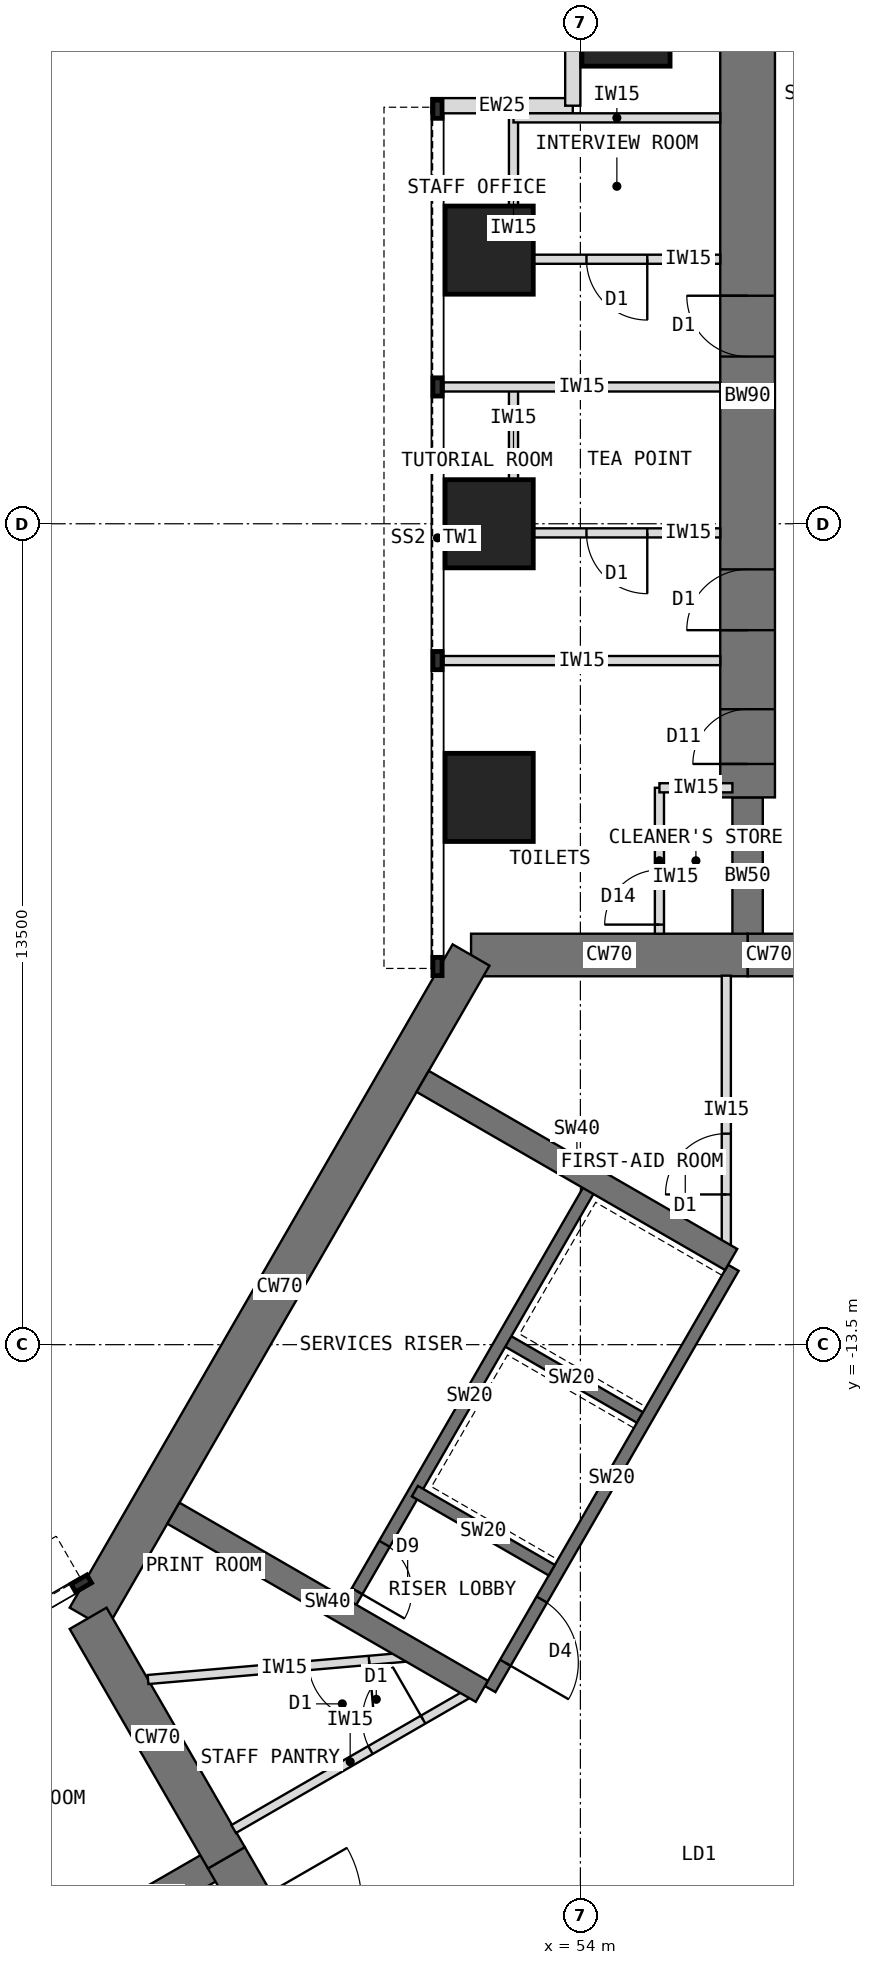
"""IFC4 building model, lengths in metres.
Left out: names, types, materials, properties, quantities, classifications, styles, units other than length and angle.
Written with IfcOpenShell. Run it as: python <this file> out.ifc"""

import sys

from ifc_helpers import new_model, si_unit, direction, frame, frame_2d, origin, origin_2d, place, context, subcontext, project, spatial, rectangle, extrude, element, fill, save


model = new_model("IFC4")
c1 = context("Model", 3, precision=1e-05, world=origin(), true_north=direction((0.0, 1.0)))
c2 = subcontext(c1, "Body", "Model", "MODEL_VIEW")
j1 = project(units=[si_unit("LENGTHUNIT", "METRE"), si_unit("PLANEANGLEUNIT", "RADIAN")], contexts=[c1])
p1 = place(None, origin())
s1 = spatial("IfcSite", under=j1, at=p1, CompositionType="ELEMENT")
p2 = place(p1, origin())
s2 = spatial("IfcBuilding", under=s1, at=p2, CompositionType="ELEMENT")
p3 = place(p2, frame((0.0, 0.0, 64.5)))
s3 = spatial("IfcBuildingStorey", under=s2, at=p3, CompositionType="ELEMENT", Elevation=64.5)
p4 = place(p3, frame((60.25, -7.092, 0.0), z_axis=(0.0, 0.0, 1.0), x_axis=(-1.0, 0.0, 0.0)))
e1 = element("IfcWall", 1, at=p4, inside=s3, PredefinedType="SHEAR", context=c2, shape_type="SweptSolid", body=[
    extrude(rectangle(XDim=3.5, YDim=0.7, at=frame_2d((1.75, 0.0))), origin(), (0.0, 0.0, 1.0), 4.0),
])
p5 = place(p4, frame((0.85, 0.0, 0.0)))
e2 = element("IfcOpeningElement", 2, at=p5, cuts=e1, PredefinedType="OPENING", context=c2, shape_type="SweptSolid", body=[
    extrude(rectangle(XDim=1.8, YDim=2.1, at=frame_2d((0.9, 1.05))), frame((0.0, 0.36, 0.0), z_axis=(0.0, -1.0, 0.0), x_axis=(1.0, 0.0, 0.0)), (0.0, 0.0, 1.0), 0.72),
])
p6 = place(p3, frame((56.75, -7.092, 0.0), z_axis=(0.0, 0.0, 1.0), x_axis=(-1.0, 0.0, 0.0)))
e3 = element("IfcWall", 3, at=p6, inside=s3, PredefinedType="SHEAR", context=c2, shape_type="SweptSolid", body=[
    extrude(rectangle(XDim=4.548, YDim=0.7, at=frame_2d((2.274, 0.0))), origin(), (0.0, 0.0, 1.0), 4.0),
])
p7 = place(p3, frame((52.202, -7.092, 0.0), z_axis=(0.0, 0.0, 1.0), x_axis=(-0.500005998175, -0.866021940709, 0.0)))
e4 = element("IfcWall", 4, at=p7, inside=s3, PredefinedType="SHEAR", context=c2, shape_type="SweptSolid", body=[
    extrude(rectangle(XDim=12.596, YDim=0.7, at=frame_2d((6.298, 0.0))), origin(), (0.0, 0.0, 1.0), 4.0),
])
p8 = place(p3, frame((45.904, -18.0, 0.0), z_axis=(0.0, 0.0, 1.0), x_axis=(0.500024481964, -0.866011268655, 0.0)))
e5 = element("IfcWall", 5, at=p8, inside=s3, PredefinedType="SHEAR", context=c2, shape_type="SweptSolid", body=[
    extrude(rectangle(XDim=4.548, YDim=0.7, at=frame_2d((2.274, 0.0))), origin(), (0.0, 0.0, 1.0), 4.0),
])
p9 = place(p3, frame((48.178, -21.939, 0.0), z_axis=(0.0, 0.0, 1.0), x_axis=(0.500010275428, -0.866019471182, 0.0)))
e6 = element("IfcWall", 6, at=p9, inside=s3, PredefinedType="SHEAR", context=c2, shape_type="SweptSolid", body=[
    extrude(rectangle(XDim=3.5, YDim=0.7, at=frame_2d((1.75, 0.0))), origin(), (0.0, 0.0, 1.0), 4.0),
])
p10 = place(p9, frame((0.85, 0.0, 0.0)))
e7 = element("IfcOpeningElement", 7, at=p10, cuts=e6, PredefinedType="OPENING", context=c2, shape_type="SweptSolid", body=[
    extrude(rectangle(XDim=1.8, YDim=2.1, at=frame_2d((0.9, 1.05))), frame((0.0, 0.36, 0.0), z_axis=(0.0, -1.0, 0.0), x_axis=(1.0, 0.0, 0.0)), (0.0, 0.0, 1.0), 0.72),
])
p11 = place(p3, frame((56.75, -7.092, 0.0), z_axis=(0.0, 0.0, 1.0), x_axis=(0.0, 1.0, 0.0)))
e8 = element("IfcWall", 8, at=p11, inside=s3, PredefinedType="SHEAR", context=c2, shape_type="SweptSolid", body=[
    extrude(rectangle(XDim=2.592, YDim=0.5, at=frame_2d((1.296, 0.0))), origin(), (0.0, 0.0, 1.0), 4.0),
])
p12 = place(p3, frame((56.75, -4.5, 0.0), z_axis=(0.0, 0.0, 1.0), x_axis=(0.0, 1.0, 0.0)))
e9 = element("IfcWall", 9, at=p12, inside=s3, PredefinedType="SHEAR", context=c2, shape_type="SweptSolid", body=[
    extrude(rectangle(XDim=13.2, YDim=0.9, at=frame_2d((6.6, 0.0))), origin(), (0.0, 0.0, 1.0), 4.0),
])
p13 = place(p12, frame((0.55, 0.0, 0.0)))
e10 = element("IfcOpeningElement", 10, at=p13, cuts=e9, PredefinedType="OPENING", context=c2, shape_type="SweptSolid", body=[
    extrude(rectangle(XDim=0.9, YDim=2.1, at=frame_2d((0.45, 1.05))), frame((0.0, 0.46, 0.0), z_axis=(0.0, -1.0, 0.0), x_axis=(1.0, 0.0, 0.0)), (0.0, 0.0, 1.0), 0.92),
])
p14 = place(p12, frame((2.75, 0.0, 0.0)))
e11 = element("IfcOpeningElement", 11, at=p14, cuts=e9, PredefinedType="OPENING", context=c2, shape_type="SweptSolid", body=[
    extrude(rectangle(XDim=1.0, YDim=2.1, at=frame_2d((0.5, 1.05))), frame((0.0, 0.46, 0.0), z_axis=(0.0, -1.0, 0.0), x_axis=(1.0, 0.0, 0.0)), (0.0, 0.0, 1.0), 0.92),
])
p15 = place(p12, frame((7.25, 0.0, 0.0)))
e12 = element("IfcOpeningElement", 12, at=p15, cuts=e9, PredefinedType="OPENING", context=c2, shape_type="SweptSolid", body=[
    extrude(rectangle(XDim=1.0, YDim=2.1, at=frame_2d((0.5, 1.05))), frame((0.0, 0.46, 0.0), z_axis=(0.0, -1.0, 0.0), x_axis=(1.0, 0.0, 0.0)), (0.0, 0.0, 1.0), 0.92),
])
p16 = place(p3, frame((48.178, -21.939, 0.0), z_axis=(0.0, 0.0, 1.0), x_axis=(-0.866072649678, -0.499918158782, 0.0)))
e13 = element("IfcWall", 13, at=p16, inside=s3, PredefinedType="SHEAR", context=c2, shape_type="SweptSolid", body=[
    extrude(rectangle(XDim=2.592, YDim=0.5, at=frame_2d((1.296, 0.0))), origin(), (0.0, 0.0, 1.0), 4.0),
])
for number, where, z_axis, x_axis in (
    (14, (52.5, -4.5, 0.0), (0.0, 0.0, 1.0), (1.0, 0.0, 0.0)),
    (15, (52.5, 0.0, 0.0), (0.0, 0.0, 1.0), (1.0, 0.0, 0.0)),
    (16, (52.5, 4.5, 0.0), (0.0, 0.0, 1.0), (1.0, 0.0, 0.0)),
    (17, (54.75, 8.25, 0.0), (0.0, 0.0, 1.0), (1.0, 0.0, 0.0)),
):
    element("IfcColumn", number, at=place(p3, frame(where, z_axis=z_axis, x_axis=x_axis)), inside=s3, PredefinedType="COLUMN", context=c2, shape_type="SweptSolid", body=[
        extrude(rectangle(XDim=1.45, YDim=1.45, at=origin_2d()), origin(), (0.0, 0.0, 1.0), 4.0),
    ])
for number, where, z_axis, x_axis in (
    (18, (51.55, 6.875, 0.0), (0.0, 0.0, 1.0), (1.0, 0.0, 0.0)),
    (19, (53.875, 6.875, 0.0), (0.0, 0.0, 1.0), (0.0, 1.0, 0.0)),
):
    element("IfcWall", number, at=place(p3, frame(where, z_axis=z_axis, x_axis=x_axis)), inside=s3, PredefinedType="STANDARD", context=c2, shape_type="SweptSolid", body=[
        extrude(rectangle(XDim=2.325, YDim=0.25, at=frame_2d((1.163, 0.0))), origin(), (0.0, 0.0, 1.0), 3.8),
    ])
p17 = place(p3, frame((56.516, -12.236, 0.0), z_axis=(0.0, 0.0, 1.0), x_axis=(-0.49999894854, -0.866026010844, 0.0)))
e20 = element("IfcWall", 20, at=p17, inside=s3, PredefinedType="SHEAR", context=c2, shape_type="SweptSolid", body=[
    extrude(rectangle(XDim=8.0, YDim=0.2, at=frame_2d((4.0, 0.0))), origin(), (0.0, 0.0, 1.0), 4.0),
])
p18 = place(p17, frame((6.3, 0.0, 0.0)))
e21 = element("IfcOpeningElement", 21, at=p18, cuts=e20, PredefinedType="OPENING", context=c2, shape_type="SweptSolid", body=[
    extrude(rectangle(XDim=1.2, YDim=2.1, at=frame_2d((0.6, 1.05))), frame((0.0, 0.11, 0.0), z_axis=(0.0, -1.0, 0.0), x_axis=(1.0, 0.0, 0.0)), (0.0, 0.0, 1.0), 0.22),
])
for number, where, z_axis, x_axis in (
    (22, (54.98, -14.697, 0.0), (0.0, 0.0, 1.0), (-0.866, 0.5, 0.0)),
    (23, (53.53, -17.209, 0.0), (0.0, 0.0, 1.0), (-0.866, 0.5, 0.0)),
):
    element("IfcWall", number, at=place(p3, frame(where, z_axis=z_axis, x_axis=x_axis)), inside=s3, PredefinedType="SHEAR", context=c2, shape_type="SweptSolid", body=[
        extrude(rectangle(XDim=2.6, YDim=0.2, at=frame_2d((1.3, 0.0))), origin(), (0.0, 0.0, 1.0), 4.0),
    ])
p19 = place(p3, frame((54.178, -10.886, 0.0), z_axis=(0.0, 0.0, 1.0), x_axis=(-0.49999894854, -0.866026010844, 0.0)))
e24 = element("IfcWall", 24, at=p19, inside=s3, PredefinedType="SHEAR", context=c2, shape_type="SweptSolid", body=[
    extrude(rectangle(XDim=8.0, YDim=0.2, at=frame_2d((4.0, 0.0))), origin(), (0.0, 0.0, 1.0), 4.0),
])
p20 = place(p19, frame((6.8, 0.0, 0.0)))
e25 = element("IfcOpeningElement", 25, at=p20, cuts=e24, PredefinedType="OPENING", context=c2, shape_type="SweptSolid", body=[
    extrude(rectangle(XDim=0.9, YDim=2.1, at=frame_2d((0.45, 1.05))), frame((0.0, 0.11, 0.0), z_axis=(0.0, -1.0, 0.0), x_axis=(1.0, 0.0, 0.0)), (0.0, 0.0, 1.0), 0.22),
])
for number, where, z_axis, x_axis in (
    (26, (52.38, -19.201, 0.0), (0.0, 0.0, 1.0), (-0.866, 0.5, 0.0)),
    (27, (56.48, -12.099, 0.0), (0.0, 0.0, 1.0), (-0.866, 0.5, 0.0)),
):
    element("IfcWall", number, at=place(p3, frame(where, z_axis=z_axis, x_axis=x_axis)), inside=s3, PredefinedType="SHEAR", context=c2, shape_type="SweptSolid", body=[
        extrude(rectangle(XDim=5.858, YDim=0.4, at=frame_2d((2.929, 0.0))), origin(), (0.0, 0.0, 1.0), 4.0),
    ])
for number, where, z_axis, x_axis in (
    (28, (56.3, -2.25, 0.0), (0.0, 0.0, 1.0), (-1.0, 0.0, 0.0)),
    (29, (56.3, 2.25, 0.0), (0.0, 0.0, 1.0), (-1.0, 0.0, 0.0)),
):
    element("IfcWall", number, at=place(p3, frame(where, z_axis=z_axis, x_axis=x_axis)), inside=s3, PredefinedType="PARTITIONING", context=c2, shape_type="SweptSolid", body=[
        extrude(rectangle(XDim=4.55, YDim=0.15, at=frame_2d((2.275, 0.0))), origin(), (0.0, 0.0, 1.0), 3.8),
    ])
p21 = place(p3, frame((52.9, -0.15, 0.0), z_axis=(0.0, 0.0, 1.0), x_axis=(0.0, 1.0, 0.0)))
e30 = element("IfcWall", 30, at=p21, inside=s3, PredefinedType="PARTITIONING", context=c2, shape_type="SweptSolid", body=[
    extrude(rectangle(XDim=2.4, YDim=0.15, at=frame_2d((1.2, 0.0))), origin(), (0.0, 0.0, 1.0), 3.8),
])
p22 = place(p3, frame((56.3, -0.15, 0.0), z_axis=(0.0, 0.0, 1.0), x_axis=(-1.0, 0.0, 0.0)))
e31 = element("IfcWall", 31, at=p22, inside=s3, PredefinedType="PARTITIONING", context=c2, shape_type="SweptSolid", body=[
    extrude(rectangle(XDim=3.4, YDim=0.15, at=frame_2d((1.7, 0.0))), origin(), (0.0, 0.0, 1.0), 3.8),
])
p23 = place(p22, frame((1.2, 0.0, 0.0)))
e32 = element("IfcOpeningElement", 32, at=p23, cuts=e31, PredefinedType="OPENING", context=c2, shape_type="SweptSolid", body=[
    extrude(rectangle(XDim=1.0, YDim=2.1, at=frame_2d((0.5, 1.05))), frame((0.0, 0.085, 0.0), z_axis=(0.0, -1.0, 0.0), x_axis=(1.0, 0.0, 0.0)), (0.0, 0.0, 1.0), 0.17),
])
p24 = place(p3, frame((52.9, 4.35, 0.0), z_axis=(0.0, 0.0, 1.0), x_axis=(0.0, 1.0, 0.0)))
e33 = element("IfcWall", 33, at=p24, inside=s3, PredefinedType="PARTITIONING", context=c2, shape_type="SweptSolid", body=[
    extrude(rectangle(XDim=2.4, YDim=0.15, at=frame_2d((1.2, 0.0))), origin(), (0.0, 0.0, 1.0), 3.8),
])
p25 = place(p3, frame((56.3, 4.35, 0.0), z_axis=(0.0, 0.0, 1.0), x_axis=(-1.0, 0.0, 0.0)))
e34 = element("IfcWall", 34, at=p25, inside=s3, PredefinedType="PARTITIONING", context=c2, shape_type="SweptSolid", body=[
    extrude(rectangle(XDim=3.4, YDim=0.15, at=frame_2d((1.7, 0.0))), origin(), (0.0, 0.0, 1.0), 3.8),
])
p26 = place(p25, frame((1.2, 0.0, 0.0)))
e35 = element("IfcOpeningElement", 35, at=p26, cuts=e34, PredefinedType="OPENING", context=c2, shape_type="SweptSolid", body=[
    extrude(rectangle(XDim=1.0, YDim=2.1, at=frame_2d((0.5, 1.05))), frame((0.0, 0.085, 0.0), z_axis=(0.0, -1.0, 0.0), x_axis=(1.0, 0.0, 0.0)), (0.0, 0.0, 1.0), 0.17),
])
p27 = place(p3, frame((56.3, 6.675, 0.0), z_axis=(0.0, 0.0, 1.0), x_axis=(-1.0, 0.0, 0.0)))
e36 = element("IfcWall", 36, at=p27, inside=s3, PredefinedType="PARTITIONING", context=c2, shape_type="SweptSolid", body=[
    extrude(rectangle(XDim=3.4, YDim=0.15, at=frame_2d((1.7, 0.0))), origin(), (0.0, 0.0, 1.0), 3.8),
])
p28 = place(p3, frame((55.3, -6.742, 0.0), z_axis=(0.0, 0.0, 1.0), x_axis=(0.0, 1.0, 0.0)))
e37 = element("IfcWall", 37, at=p28, inside=s3, PredefinedType="PARTITIONING", context=c2, shape_type="SweptSolid", body=[
    extrude(rectangle(XDim=2.4, YDim=0.15, at=frame_2d((1.2, 0.0))), origin(), (0.0, 0.0, 1.0), 3.8),
])
p29 = place(p28, frame((0.15, 0.0, 0.0)))
e38 = element("IfcOpeningElement", 38, at=p29, cuts=e37, PredefinedType="OPENING", context=c2, shape_type="SweptSolid", body=[
    extrude(rectangle(XDim=0.9, YDim=2.1, at=frame_2d((0.45, 1.05))), frame((0.0, 0.085, 0.0), z_axis=(0.0, -1.0, 0.0), x_axis=(1.0, 0.0, 0.0)), (0.0, 0.0, 1.0), 0.17),
])
p30 = place(p3, frame((56.5, -4.342, 0.0), z_axis=(0.0, 0.0, 1.0), x_axis=(-1.0, 0.0, 0.0)))
e39 = element("IfcWall", 39, at=p30, inside=s3, PredefinedType="PARTITIONING", context=c2, shape_type="SweptSolid", body=[
    extrude(rectangle(XDim=1.2, YDim=0.15, at=frame_2d((0.6, 0.0))), origin(), (0.0, 0.0, 1.0), 3.8),
])
p31 = place(p3, frame((48.298, -21.466, 0.0), z_axis=(0.0, 0.0, 1.0), x_axis=(0.866021148949, 0.500007369519, 0.0)))
e40 = element("IfcWall", 40, at=p31, inside=s3, PredefinedType="PARTITIONING", context=c2, shape_type="SweptSolid", body=[
    extrude(rectangle(XDim=4.426, YDim=0.15, at=frame_2d((2.213, 0.0))), origin(), (0.0, 0.0, 1.0), 3.8),
])
p32 = place(p31, frame((2.598, 0.0, 0.0)))
e41 = element("IfcOpeningElement", 41, at=p32, cuts=e40, PredefinedType="OPENING", context=c2, shape_type="SweptSolid", body=[
    extrude(rectangle(XDim=1.0, YDim=2.1, at=frame_2d((0.5, 1.05))), frame((0.0, 0.085, 0.0), z_axis=(0.0, -1.0, 0.0), x_axis=(1.0, 0.0, 0.0)), (0.0, 0.0, 1.0), 0.17),
])
p33 = place(p3, frame((56.4, -11.857, 0.0), z_axis=(0.0, 0.0, 1.0), x_axis=(0.0, 1.0, 0.0)))
e42 = element("IfcWall", 42, at=p33, inside=s3, PredefinedType="PARTITIONING", context=c2, shape_type="SweptSolid", body=[
    extrude(rectangle(XDim=4.426, YDim=0.15, at=frame_2d((2.213, 0.0))), origin(), (0.0, 0.0, 1.0), 3.8),
])
p34 = place(p33, frame((0.828, 0.0, 0.0)))
e43 = element("IfcOpeningElement", 43, at=p34, cuts=e42, PredefinedType="OPENING", context=c2, shape_type="SweptSolid", body=[
    extrude(rectangle(XDim=1.0, YDim=2.1, at=frame_2d((0.5, 1.05))), frame((0.0, 0.085, 0.0), z_axis=(0.0, -1.0, 0.0), x_axis=(1.0, 0.0, 0.0)), (0.0, 0.0, 1.0), 0.17),
])
p35 = place(p3, frame((51.371, -18.618, 0.0), z_axis=(0.0, 0.0, 1.0), x_axis=(-0.996259708579, -0.086409450071, 0.0)))
e44 = element("IfcWall", 44, at=p35, inside=s3, PredefinedType="PARTITIONING", context=c2, shape_type="SweptSolid", body=[
    extrude(rectangle(XDim=4.498, YDim=0.15, at=frame_2d((2.249, 0.0))), origin(), (0.0, 0.0, 1.0), 3.8),
])
p36 = place(p35, frame((0.849, 0.0, 0.0)))
e45 = element("IfcOpeningElement", 45, at=p36, cuts=e44, PredefinedType="OPENING", context=c2, shape_type="SweptSolid", body=[
    extrude(rectangle(XDim=1.0, YDim=2.1, at=frame_2d((0.5, 1.05))), frame((0.0, 0.085, 0.0), z_axis=(0.0, -1.0, 0.0), x_axis=(1.0, 0.0, 0.0)), (0.0, 0.0, 1.0), 0.17),
])
p37 = place(p18, origin())
e46 = element("IfcDoor", 46, at=p37, inside=s3, OperationType="SINGLE_SWING_RIGHT", PredefinedType="DOOR", context=c2, shape_type="SweptSolid", body=[
    extrude(rectangle(XDim=1.2, YDim=2.1, at=frame_2d((0.6, 1.05))), frame((0.0, 0.025, 0.0), z_axis=(0.0, -1.0, 0.0), x_axis=(1.0, 0.0, 0.0)), (0.0, 0.0, 1.0), 0.05),
])
fill(e21, e46)
p38 = place(p20, origin())
e47 = element("IfcDoor", 47, at=p38, inside=s3, OperationType="SINGLE_SWING_RIGHT", PredefinedType="DOOR", context=c2, shape_type="SweptSolid", body=[
    extrude(rectangle(XDim=0.9, YDim=2.1, at=frame_2d((0.45, 1.05))), frame((0.0, 0.025, 0.0), z_axis=(0.0, -1.0, 0.0), x_axis=(1.0, 0.0, 0.0)), (0.0, 0.0, 1.0), 0.05),
])
fill(e25, e47)
p39 = place(p23, origin())
e48 = element("IfcDoor", 48, at=p39, inside=s3, OperationType="SINGLE_SWING_LEFT", PredefinedType="DOOR", context=c2, shape_type="SweptSolid", body=[
    extrude(rectangle(XDim=1.0, YDim=2.1, at=frame_2d((0.5, 1.05))), frame((0.0, 0.025, 0.0), z_axis=(0.0, -1.0, 0.0), x_axis=(1.0, 0.0, 0.0)), (0.0, 0.0, 1.0), 0.05),
])
fill(e32, e48)
p40 = place(p26, origin())
e49 = element("IfcDoor", 49, at=p40, inside=s3, OperationType="SINGLE_SWING_LEFT", PredefinedType="DOOR", context=c2, shape_type="SweptSolid", body=[
    extrude(rectangle(XDim=1.0, YDim=2.1, at=frame_2d((0.5, 1.05))), frame((0.0, 0.025, 0.0), z_axis=(0.0, -1.0, 0.0), x_axis=(1.0, 0.0, 0.0)), (0.0, 0.0, 1.0), 0.05),
])
fill(e35, e49)
p41 = place(p29, origin())
e50 = element("IfcDoor", 50, at=p41, inside=s3, OperationType="SINGLE_SWING_LEFT", PredefinedType="DOOR", context=c2, shape_type="SweptSolid", body=[
    extrude(rectangle(XDim=0.9, YDim=2.1, at=frame_2d((0.45, 1.05))), frame((0.0, 0.025, 0.0), z_axis=(0.0, -1.0, 0.0), x_axis=(1.0, 0.0, 0.0)), (0.0, 0.0, 1.0), 0.05),
])
fill(e38, e50)
p42 = place(p36, origin())
e51 = element("IfcDoor", 51, at=p42, inside=s3, OperationType="SINGLE_SWING_LEFT", PredefinedType="DOOR", context=c2, shape_type="SweptSolid", body=[
    extrude(rectangle(XDim=1.0, YDim=2.1, at=frame_2d((0.5, 1.05))), frame((0.0, 0.025, 0.0), z_axis=(0.0, -1.0, 0.0), x_axis=(1.0, 0.0, 0.0)), (0.0, 0.0, 1.0), 0.05),
])
fill(e45, e51)
p43 = place(p32, origin())
e52 = element("IfcDoor", 52, at=p43, inside=s3, OperationType="SINGLE_SWING_RIGHT", PredefinedType="DOOR", context=c2, shape_type="SweptSolid", body=[
    extrude(rectangle(XDim=1.0, YDim=2.1, at=frame_2d((0.5, 1.05))), frame((0.0, 0.025, 0.0), z_axis=(0.0, -1.0, 0.0), x_axis=(1.0, 0.0, 0.0)), (0.0, 0.0, 1.0), 0.05),
])
fill(e41, e52)
p44 = place(p34, origin())
e53 = element("IfcDoor", 53, at=p44, inside=s3, OperationType="SINGLE_SWING_LEFT", PredefinedType="DOOR", context=c2, shape_type="SweptSolid", body=[
    extrude(rectangle(XDim=1.0, YDim=2.1, at=frame_2d((0.5, 1.05))), frame((0.0, 0.025, 0.0), z_axis=(0.0, -1.0, 0.0), x_axis=(1.0, 0.0, 0.0)), (0.0, 0.0, 1.0), 0.05),
])
fill(e43, e53)
p45 = place(p13, origin())
e54 = element("IfcDoor", 54, at=p45, inside=s3, OperationType="SINGLE_SWING_LEFT", PredefinedType="DOOR", context=c2, shape_type="SweptSolid", body=[
    extrude(rectangle(XDim=0.82, YDim=2.06, at=frame_2d((0.45, 1.03))), frame((0.0, 0.025, 0.0), z_axis=(0.0, -1.0, 0.0), x_axis=(1.0, 0.0, 0.0)), (0.0, 0.0, 1.0), 0.05),
    extrude(rectangle(XDim=0.04, YDim=2.1, at=frame_2d((0.02, 1.05))), frame((0.0, 0.45, 0.0), z_axis=(0.0, -1.0, 0.0), x_axis=(1.0, 0.0, 0.0)), (0.0, 0.0, 1.0), 0.899),
    extrude(rectangle(XDim=0.04, YDim=2.1, at=frame_2d((0.88, 1.05))), frame((0.0, 0.45, 0.0), z_axis=(0.0, -1.0, 0.0), x_axis=(1.0, 0.0, 0.0)), (0.0, 0.0, 1.0), 0.899),
    extrude(rectangle(XDim=0.82, YDim=0.04, at=frame_2d((0.45, 2.08))), frame((0.0, 0.45, 0.0), z_axis=(0.0, -1.0, 0.0), x_axis=(1.0, 0.0, 0.0)), (0.0, 0.0, 1.0), 0.899),
])
fill(e10, e54)
p46 = place(p14, origin())
e55 = element("IfcDoor", 55, at=p46, inside=s3, OperationType="SINGLE_SWING_LEFT", PredefinedType="DOOR", context=c2, shape_type="SweptSolid", body=[
    extrude(rectangle(XDim=0.92, YDim=2.06, at=frame_2d((0.5, 1.03))), frame((0.0, 0.025, 0.0), z_axis=(0.0, -1.0, 0.0), x_axis=(1.0, 0.0, 0.0)), (0.0, 0.0, 1.0), 0.05),
    extrude(rectangle(XDim=0.04, YDim=2.1, at=frame_2d((0.02, 1.05))), frame((0.0, 0.45, 0.0), z_axis=(0.0, -1.0, 0.0), x_axis=(1.0, 0.0, 0.0)), (0.0, 0.0, 1.0), 0.899),
    extrude(rectangle(XDim=0.04, YDim=2.1, at=frame_2d((0.98, 1.05))), frame((0.0, 0.45, 0.0), z_axis=(0.0, -1.0, 0.0), x_axis=(1.0, 0.0, 0.0)), (0.0, 0.0, 1.0), 0.899),
    extrude(rectangle(XDim=0.92, YDim=0.04, at=frame_2d((0.5, 2.08))), frame((0.0, 0.45, 0.0), z_axis=(0.0, -1.0, 0.0), x_axis=(1.0, 0.0, 0.0)), (0.0, 0.0, 1.0), 0.899),
])
fill(e11, e55)
p47 = place(p15, origin())
e56 = element("IfcDoor", 56, at=p47, inside=s3, OperationType="SINGLE_SWING_RIGHT", PredefinedType="DOOR", context=c2, shape_type="SweptSolid", body=[
    extrude(rectangle(XDim=0.92, YDim=2.06, at=frame_2d((0.5, 1.03))), frame((0.0, 0.025, 0.0), z_axis=(0.0, -1.0, 0.0), x_axis=(1.0, 0.0, 0.0)), (0.0, 0.0, 1.0), 0.05),
    extrude(rectangle(XDim=0.04, YDim=2.1, at=frame_2d((0.02, 1.05))), frame((0.0, 0.45, 0.0), z_axis=(0.0, -1.0, 0.0), x_axis=(1.0, 0.0, 0.0)), (0.0, 0.0, 1.0), 0.899),
    extrude(rectangle(XDim=0.04, YDim=2.1, at=frame_2d((0.98, 1.05))), frame((0.0, 0.45, 0.0), z_axis=(0.0, -1.0, 0.0), x_axis=(1.0, 0.0, 0.0)), (0.0, 0.0, 1.0), 0.899),
    extrude(rectangle(XDim=0.92, YDim=0.04, at=frame_2d((0.5, 2.08))), frame((0.0, 0.45, 0.0), z_axis=(0.0, -1.0, 0.0), x_axis=(1.0, 0.0, 0.0)), (0.0, 0.0, 1.0), 0.899),
])
fill(e12, e56)
save(model, sys.argv[1])
